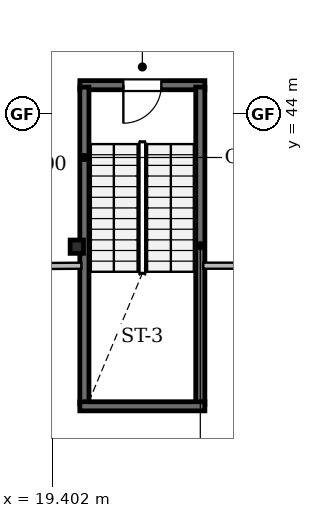
"""IFC4 building model, lengths in metres.
Left out: names, types, materials, properties, quantities, classifications, styles, units other than length and angle.
Written with IfcOpenShell. Run it as: python <this file> out.ifc"""

import sys

from ifc_helpers import new_model, si_unit, direction, frame, frame_2d, origin, origin_2d, place, context, subcontext, project, spatial, rectangle, i_section, extrude, element, fill, save


model = new_model("IFC4")
c1 = context("Model", 3, precision=1e-05, world=origin(), true_north=direction((0.0, 1.0)))
c2 = subcontext(c1, "Body", "Model", "MODEL_VIEW")
j1 = project(units=[si_unit("LENGTHUNIT", "METRE"), si_unit("PLANEANGLEUNIT", "RADIAN")], contexts=[c1])
p1 = place(None, origin())
s1 = spatial("IfcSite", under=j1, at=p1, CompositionType="ELEMENT")
p2 = place(p1, origin())
s2 = spatial("IfcBuilding", under=s1, at=p2, CompositionType="ELEMENT")
p3 = place(p2, frame((0.0, 0.0, 9.6)))
s3 = spatial("IfcBuildingStorey", under=s2, at=p3, CompositionType="ELEMENT", Elevation=9.6)
p4 = place(p3, frame((20.05, 40.5, 0.0), z_axis=(0.0, 0.0, 1.0), x_axis=(1.0, 0.0, 0.0)))
e1 = element("IfcColumn", 1, at=p4, inside=s3, PredefinedType="PILASTER", context=c2, shape_type="SweptSolid", body=[
    extrude(i_section(OverallWidth=0.35, OverallDepth=0.35, WebThickness=0.012, FlangeThickness=0.019, FilletRadius=0.02, at=origin_2d()), origin(), (0.0, 0.0, 1.0), 4.8),
])
p5 = place(p3, frame((20.13, 44.75, 0.0), z_axis=(0.0, 0.0, 1.0), x_axis=(1.0, 0.0, 0.0)))
e2 = element("IfcWall", 2, at=p5, inside=s3, PredefinedType="SHEAR", context=c2, shape_type="SweptSolid", body=[
    extrude(rectangle(XDim=3.29, YDim=0.24, at=frame_2d((1.645, 0.0))), origin(), (0.0, 0.0, 1.0), 4.5),
])
p6 = place(p5, frame((1.145, 0.0, 0.0)))
e3 = element("IfcOpeningElement", 3, at=p6, cuts=e2, PredefinedType="OPENING", context=c2, shape_type="SweptSolid", body=[
    extrude(rectangle(XDim=1.0, YDim=2.15, at=frame_2d((0.5, 1.075))), frame((0.0, 0.13, 0.0), z_axis=(0.0, -1.0, 0.0), x_axis=(1.0, 0.0, 0.0)), (0.0, 0.0, 1.0), 0.26),
])
for number, where, z_axis, x_axis in (
    (4, (20.25, 36.35, 0.0), (0.0, 0.0, 1.0), (0.0, 1.0, 0.0)),
    (5, (23.3, 36.35, 0.0), (0.0, 0.0, 1.0), (0.0, 1.0, 0.0)),
):
    element("IfcWall", number, at=place(p3, frame(where, z_axis=z_axis, x_axis=x_axis)), inside=s3, PredefinedType="SHEAR", context=c2, shape_type="SweptSolid", body=[
        extrude(rectangle(XDim=8.35, YDim=0.24, at=frame_2d((4.175, 0.0))), origin(), (0.0, 0.0, 1.0), 4.5),
    ])
p7 = place(p3, frame((20.13, 36.3, 0.0), z_axis=(0.0, 0.0, 1.0), x_axis=(1.0, 0.0, 0.0)))
e6 = element("IfcWall", 6, at=p7, inside=s3, PredefinedType="SHEAR", context=c2, shape_type="SweptSolid", body=[
    extrude(rectangle(XDim=3.29, YDim=0.24, at=frame_2d((1.645, 0.0))), origin(), (0.0, 0.0, 1.0), 4.5),
])
p8 = place(p3, frame((33.32, 40.0, 0.0), z_axis=(0.0, 0.0, 1.0), x_axis=(-1.0, 0.0, 0.0)))
e7 = element("IfcWall", 7, at=p8, inside=s3, PredefinedType="SOLIDWALL", context=c2, shape_type="SweptSolid", body=[
    extrude(rectangle(XDim=9.94, YDim=0.16, at=frame_2d((4.97, 0.0))), origin(), (0.0, 0.0, 1.0), 3.588),
])
p9 = place(p3, frame((20.17, 39.999, 0.0), z_axis=(0.0, 0.0, 1.0), x_axis=(-0.999976595038, -0.006841737877, 0.0)))
e8 = element("IfcWall", 8, at=p9, inside=s3, PredefinedType="SOLIDWALL", context=c2, shape_type="SweptSolid", body=[
    extrude(rectangle(XDim=4.96, YDim=0.16, at=frame_2d((2.48, 0.0))), origin(), (0.0, 0.0, 1.0), 4.5),
])
p10 = place(p6, frame((1.0, 0.0, 0.0), z_axis=(0.0, 0.0, 1.0), x_axis=(-1.0, 0.0, 0.0)))
e9 = element("IfcDoor", 9, at=p10, inside=s3, OperationType="SINGLE_SWING_LEFT", PredefinedType="DOOR", context=c2, shape_type="SweptSolid", body=[
    extrude(rectangle(XDim=1.0, YDim=2.15, at=frame_2d((0.5, 1.075))), frame((0.0, 0.025, 0.0), z_axis=(0.0, -1.0, 0.0), x_axis=(1.0, 0.0, 0.0)), (0.0, 0.0, 1.0), 0.05),
])
fill(e3, e9)
save(model, sys.argv[1])
